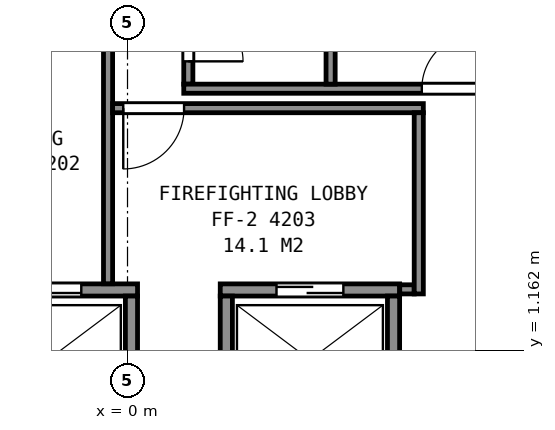
"""IFC4 building model, lengths in metres.
Left out: names, types, materials, properties, quantities, classifications, styles, units other than length and angle.
Written with IfcOpenShell. Run it as: python <this file> out.ifc"""

import sys

from ifc_helpers import new_model, si_unit, direction, frame, frame_2d, origin, place, context, subcontext, project, spatial, rectangle, extrude, element, fill, save


model = new_model("IFC4")
c1 = context("Model", 3, precision=1e-05, world=origin(), true_north=direction((0.0, 1.0)))
c2 = subcontext(c1, "Body", "Model", "MODEL_VIEW")
j1 = project(units=[si_unit("LENGTHUNIT", "METRE"), si_unit("PLANEANGLEUNIT", "RADIAN")], contexts=[c1])
p1 = place(None, origin())
s1 = spatial("IfcSite", under=j1, at=p1, CompositionType="ELEMENT")
p2 = place(p1, origin())
s2 = spatial("IfcBuilding", under=s1, at=p2, CompositionType="ELEMENT")
p3 = place(p2, frame((0.0, 0.0, 171.0)))
s3 = spatial("IfcBuildingStorey", under=s2, at=p3, CompositionType="ELEMENT", Elevation=171.0)
p4 = place(p3, frame((-2.785, 2.15, 0.0), z_axis=(0.0, 0.0, 1.0), x_axis=(1.0, 0.0, 0.0)))
e1 = element("IfcWall", 1, at=p4, inside=s3, PredefinedType="PARTITIONING", context=c2, shape_type="SweptSolid", body=[
    extrude(rectangle(XDim=2.95, YDim=0.2, at=frame_2d((1.475, 0.0))), origin(), (0.0, 0.0, 1.0), 3.7),
])
p5 = place(p4, frame((0.925, 0.0, 0.0)))
e2 = element("IfcOpeningElement", 2, at=p5, cuts=e1, PredefinedType="OPENING", context=c2, shape_type="SweptSolid", body=[
    extrude(rectangle(XDim=1.1, YDim=2.1, at=frame_2d((0.55, 1.05))), frame((0.0, 0.11, 0.0), z_axis=(0.0, -1.0, 0.0), x_axis=(1.0, 0.0, 0.0)), (0.0, 0.0, 1.0), 0.22),
])
p6 = place(p3, frame((1.525, 2.15, 0.0), z_axis=(0.0, 0.0, 1.0), x_axis=(1.0, 0.0, 0.0)))
e3 = element("IfcWall", 3, at=p6, inside=s3, PredefinedType="PARTITIONING", context=c2, shape_type="SweptSolid", body=[
    extrude(rectangle(XDim=2.95, YDim=0.2, at=frame_2d((1.475, 0.0))), origin(), (0.0, 0.0, 1.0), 3.7),
])
p7 = place(p6, frame((0.925, 0.0, 0.0)))
e4 = element("IfcOpeningElement", 4, at=p7, cuts=e3, PredefinedType="OPENING", context=c2, shape_type="SweptSolid", body=[
    extrude(rectangle(XDim=1.1, YDim=2.1, at=frame_2d((0.55, 1.05))), frame((0.0, 0.11, 0.0), z_axis=(0.0, -1.0, 0.0), x_axis=(1.0, 0.0, 0.0)), (0.0, 0.0, 1.0), 0.22),
])
p8 = place(p3, frame((5.663, -1.612, 0.0), z_axis=(0.0, 0.0, 1.0), x_axis=(0.49998122708, 0.866036242063, 0.0)))
e5 = element("IfcWall", 5, at=p8, inside=s3, PredefinedType="PARTITIONING", context=c2, shape_type="SweptSolid", body=[
    extrude(rectangle(XDim=4.9, YDim=0.2, at=frame_2d((2.45, 0.0))), origin(), (0.0, 0.0, 1.0), 3.7),
])
for number, where, z_axis, x_axis in (
    (6, (4.375, 0.1, 0.0), (0.0, 0.0, 1.0), (0.0, 1.0, 0.0)),
    (7, (1.625, 0.1, 0.0), (0.0, 0.0, 1.0), (0.0, 1.0, 0.0)),
    (8, (0.065, 0.1, 0.0), (0.0, 0.0, 1.0), (0.0, 1.0, 0.0)),
):
    element("IfcWall", number, at=place(p3, frame(where, z_axis=z_axis, x_axis=x_axis)), inside=s3, PredefinedType="PARTITIONING", context=c2, shape_type="SweptSolid", body=[
        extrude(rectangle(XDim=1.95, YDim=0.2, at=frame_2d((0.975, 0.0))), origin(), (0.0, 0.0, 1.0), 3.7),
    ])
p9 = place(p3, frame((-0.32, 2.252, 0.0), z_axis=(0.0, 0.0, 1.0), x_axis=(0.0, 1.0, 0.0)))
e9 = element("IfcWall", 9, at=p9, inside=s3, PredefinedType="PARTITIONING", context=c2, shape_type="SweptSolid", body=[
    extrude(rectangle(XDim=4.063, YDim=0.15, at=frame_2d((2.031, 0.0))), origin(), (0.0, 0.0, 1.0), 3.45),
])
p10 = place(p3, frame((-0.245, 5.14, 0.0), z_axis=(0.0, 0.0, 1.0), x_axis=(1.0, 0.0, 0.0)))
e10 = element("IfcWall", 10, at=p10, inside=s3, PredefinedType="PARTITIONING", context=c2, shape_type="SweptSolid", body=[
    extrude(rectangle(XDim=5.11, YDim=0.15, at=frame_2d((2.555, 0.0))), origin(), (0.0, 0.0, 1.0), 3.45),
])
p11 = place(p10, frame((0.175, 0.0, 0.0)))
e11 = element("IfcOpeningElement", 11, at=p11, cuts=e10, PredefinedType="OPENING", context=c2, shape_type="SweptSolid", body=[
    extrude(rectangle(XDim=1.0, YDim=2.1, at=frame_2d((0.5, 1.05))), frame((0.0, 0.085, 0.0), z_axis=(0.0, -1.0, 0.0), x_axis=(1.0, 0.0, 0.0)), (0.0, 0.0, 1.0), 0.17),
])
p12 = place(p3, frame((1.0, 7.56, 0.0), z_axis=(0.0, 0.0, 1.0), x_axis=(0.0, -1.0, 0.0)))
e12 = element("IfcWall", 12, at=p12, inside=s3, PredefinedType="PARTITIONING", context=c2, shape_type="SweptSolid", body=[
    extrude(rectangle(XDim=2.025, YDim=0.15, at=frame_2d((1.013, 0.0))), origin(), (0.0, 0.0, 1.0), 3.45),
])
p13 = place(p12, frame((0.75, 0.0, 0.0)))
e13 = element("IfcOpeningElement", 13, at=p13, cuts=e12, PredefinedType="OPENING", context=c2, shape_type="SweptSolid", body=[
    extrude(rectangle(XDim=0.9, YDim=2.1, at=frame_2d((0.45, 1.05))), frame((0.0, 0.085, 0.0), z_axis=(0.0, -1.0, 0.0), x_axis=(1.0, 0.0, 0.0)), (0.0, 0.0, 1.0), 0.17),
])
p14 = place(p3, frame((0.925, 5.46, 0.0), z_axis=(0.0, 0.0, 1.0), x_axis=(1.0, 0.0, 0.0)))
e14 = element("IfcWall", 14, at=p14, inside=s3, PredefinedType="PARTITIONING", context=c2, shape_type="SweptSolid", body=[
    extrude(rectangle(XDim=5.22, YDim=0.15, at=frame_2d((2.61, 0.0))), origin(), (0.0, 0.0, 1.0), 3.45),
])
p15 = place(p14, frame((3.915, 0.0, 0.0)))
e15 = element("IfcOpeningElement", 15, at=p15, cuts=e14, PredefinedType="OPENING", context=c2, shape_type="SweptSolid", body=[
    extrude(rectangle(XDim=0.9, YDim=2.1, at=frame_2d((0.45, 1.05))), frame((0.0, 0.085, 0.0), z_axis=(0.0, -1.0, 0.0), x_axis=(1.0, 0.0, 0.0)), (0.0, 0.0, 1.0), 0.17),
])
p16 = place(p3, frame((3.34, 5.535, 0.0), z_axis=(0.0, 0.0, 1.0), x_axis=(0.0, 1.0, 0.0)))
e16 = element("IfcWall", 16, at=p16, inside=s3, PredefinedType="PARTITIONING", context=c2, shape_type="SweptSolid", body=[
    extrude(rectangle(XDim=2.025, YDim=0.15, at=frame_2d((1.013, 0.0))), origin(), (0.0, 0.0, 1.0), 3.45),
])
p17 = place(p3, frame((4.477, 2.16, 0.0), z_axis=(0.0, 0.0, 1.0), x_axis=(1.0, 0.0, 0.0)))
e17 = element("IfcWall", 17, at=p17, inside=s3, PredefinedType="PARTITIONING", context=c2, shape_type="SweptSolid", body=[
    extrude(rectangle(XDim=0.238, YDim=0.15, at=frame_2d((0.119, 0.0))), origin(), (0.0, 0.0, 1.0), 3.45),
])
p18 = place(p3, frame((4.79, 2.085, 0.0), z_axis=(0.0, 0.0, 1.0), x_axis=(0.0, 1.0, 0.0)))
e18 = element("IfcWall", 18, at=p18, inside=s3, PredefinedType="PARTITIONING", context=c2, shape_type="SweptSolid", body=[
    extrude(rectangle(XDim=2.98, YDim=0.15, at=frame_2d((1.49, 0.0))), origin(), (0.0, 0.0, 1.0), 3.45),
])
p19 = place(p3, frame((12.916, 2.767, 0.0), z_axis=(0.0, 0.0, 1.0), x_axis=(-0.499999767326, -0.866025538119, 0.0)))
e19 = element("IfcWall", 19, at=p19, inside=s3, PredefinedType="PARTITIONING", context=c2, shape_type="SweptSolid", body=[
    extrude(rectangle(XDim=17.731, YDim=0.2, at=frame_2d((8.865, 0.0))), origin(), (0.0, 0.0, 1.0), 2.713),
])
p20 = place(p19, frame((14.293, 0.0, 0.0)))
e20 = element("IfcOpeningElement", 20, at=p20, cuts=e19, PredefinedType="OPENING", context=c2, shape_type="SweptSolid", body=[
    extrude(rectangle(XDim=0.9, YDim=2.1, at=frame_2d((0.45, 1.05))), frame((0.0, 0.11, 0.0), z_axis=(0.0, -1.0, 0.0), x_axis=(1.0, 0.0, 0.0)), (0.0, 0.0, 1.0), 0.22),
])
p21 = place(p19, frame((10.622, 0.0, 0.0)))
e21 = element("IfcOpeningElement", 21, at=p21, cuts=e19, PredefinedType="OPENING", context=c2, shape_type="SweptSolid", body=[
    extrude(rectangle(XDim=0.9, YDim=2.1, at=frame_2d((0.45, 1.05))), frame((0.0, 0.11, 0.0), z_axis=(0.0, -1.0, 0.0), x_axis=(1.0, 0.0, 0.0)), (0.0, 0.0, 1.0), 0.22),
])
p22 = place(p19, frame((3.897, 0.0, 0.0)))
e22 = element("IfcOpeningElement", 22, at=p22, cuts=e19, PredefinedType="OPENING", context=c2, shape_type="SweptSolid", body=[
    extrude(rectangle(XDim=0.9, YDim=2.1, at=frame_2d((0.45, 1.05))), frame((0.0, 0.11, 0.0), z_axis=(0.0, -1.0, 0.0), x_axis=(1.0, 0.0, 0.0)), (0.0, 0.0, 1.0), 0.22),
])
p23 = place(p19, frame((0.283, 0.0, 0.0)))
e23 = element("IfcOpeningElement", 23, at=p23, cuts=e19, PredefinedType="OPENING", context=c2, shape_type="SweptSolid", body=[
    extrude(rectangle(XDim=0.9, YDim=2.1, at=frame_2d((0.45, 1.05))), frame((0.0, 0.11, 0.0), z_axis=(0.0, -1.0, 0.0), x_axis=(1.0, 0.0, 0.0)), (0.0, 0.0, 1.0), 0.22),
])
p24 = place(p5, origin())
e24 = element("IfcDoor", 24, at=p24, inside=s3, OperationType="SLIDING_TO_LEFT", PredefinedType="DOOR", context=c2, shape_type="SweptSolid", body=[
    extrude(rectangle(XDim=1.1, YDim=2.1, at=frame_2d((0.55, 1.05))), frame((0.0, 0.025, 0.0), z_axis=(0.0, -1.0, 0.0), x_axis=(1.0, 0.0, 0.0)), (0.0, 0.0, 1.0), 0.05),
])
fill(e2, e24)
p25 = place(p7, origin())
e25 = element("IfcDoor", 25, at=p25, inside=s3, OperationType="SLIDING_TO_RIGHT", PredefinedType="DOOR", context=c2, shape_type="SweptSolid", body=[
    extrude(rectangle(XDim=1.1, YDim=2.1, at=frame_2d((0.55, 1.05))), frame((0.0, 0.025, 0.0), z_axis=(0.0, -1.0, 0.0), x_axis=(1.0, 0.0, 0.0)), (0.0, 0.0, 1.0), 0.05),
])
fill(e4, e25)
p26 = place(p11, origin())
e26 = element("IfcDoor", 26, at=p26, inside=s3, OperationType="SINGLE_SWING_LEFT", PredefinedType="DOOR", context=c2, shape_type="SweptSolid", body=[
    extrude(rectangle(XDim=1.0, YDim=2.1, at=frame_2d((0.5, 1.05))), frame((0.0, 0.025, 0.0), z_axis=(0.0, -1.0, 0.0), x_axis=(1.0, 0.0, 0.0)), (0.0, 0.0, 1.0), 0.05),
])
fill(e11, e26)
p27 = place(p13, origin())
e27 = element("IfcDoor", 27, at=p27, inside=s3, OperationType="SINGLE_SWING_RIGHT", PredefinedType="DOOR", context=c2, shape_type="SweptSolid", body=[
    extrude(rectangle(XDim=0.9, YDim=2.1, at=frame_2d((0.45, 1.05))), frame((0.0, 0.025, 0.0), z_axis=(0.0, -1.0, 0.0), x_axis=(1.0, 0.0, 0.0)), (0.0, 0.0, 1.0), 0.05),
])
fill(e13, e27)
p28 = place(p15, origin())
e28 = element("IfcDoor", 28, at=p28, inside=s3, OperationType="SINGLE_SWING_RIGHT", PredefinedType="DOOR", context=c2, shape_type="SweptSolid", body=[
    extrude(rectangle(XDim=0.9, YDim=2.1, at=frame_2d((0.45, 1.05))), frame((0.0, 0.025, 0.0), z_axis=(0.0, -1.0, 0.0), x_axis=(1.0, 0.0, 0.0)), (0.0, 0.0, 1.0), 0.05),
])
fill(e15, e28)
save(model, sys.argv[1])
